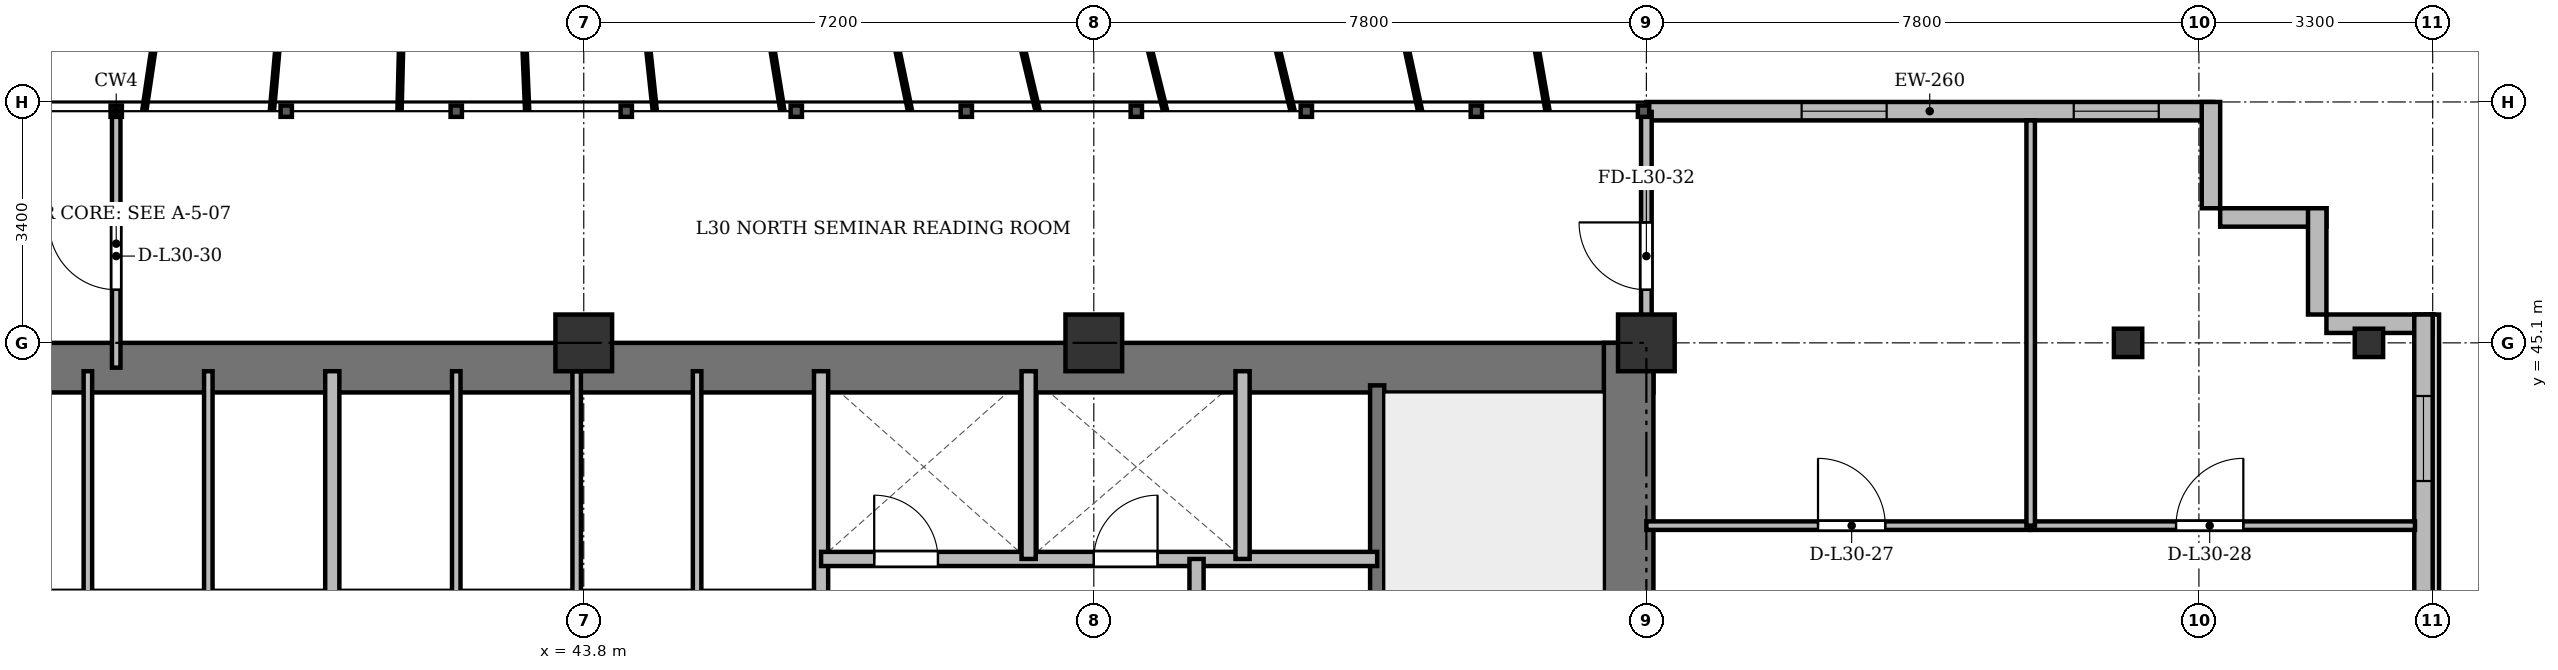
"""IFC4 building model, lengths in metres.
Left out: names, types, materials, properties, quantities, classifications, styles, units other than length and angle.
Written with IfcOpenShell. Run it as: python <this file> out.ifc"""

import sys

from ifc_helpers import new_model, si_unit, direction, frame, frame_2d, origin, origin_2d, place, context, subcontext, project, spatial, rectangle, i_section, extrude, source, transform, mapped, element, fill, save


model = new_model("IFC4")
c1 = context("Model", 3, precision=1e-05, world=origin(), true_north=direction((0.0, 1.0)))
c2 = subcontext(c1, "Body", "Model", "MODEL_VIEW")
j1 = project(units=[si_unit("LENGTHUNIT", "METRE"), si_unit("PLANEANGLEUNIT", "RADIAN")], contexts=[c1])
p1 = place(None, origin())
s1 = spatial("IfcSite", under=j1, at=p1, CompositionType="ELEMENT")
p2 = place(p1, origin())
s2 = spatial("IfcBuilding", under=s1, at=p2, CompositionType="ELEMENT")
p3 = place(p2, frame((0.0, 0.0, 117.7)))
s3 = spatial("IfcBuildingStorey", under=s2, at=p3, CompositionType="ELEMENT", Elevation=117.7)
m1 = source(origin(), c2, "Body", "SweptSolid", [
    extrude(rectangle(XDim=0.8, YDim=0.8, at=origin_2d()), origin(), (0.0, 0.0, 1.0), 3.6),
])
for number, where, z_axis, x_axis in (
    (1, (43.8, 45.1, 0.0), (0.0, 0.0, 1.0), (1.0, 0.0, 0.0)),
    (2, (51.0, 45.1, 0.0), (0.0, 0.0, 1.0), (1.0, 0.0, 0.0)),
    (3, (58.8, 45.1, 0.0), (0.0, 0.0, 1.0), (1.0, 0.0, 0.0)),
):
    element("IfcColumn", number, at=place(p3, frame(where, z_axis=z_axis, x_axis=x_axis)), inside=s3, PredefinedType="COLUMN", context=c2, shape_type="MappedRepresentation", body=[
        mapped(m1, transform((0.0, 0.0, 0.0), x_axis=(1.0, 0.0, 0.0), y_axis=(0.0, 1.0, 0.0), z_axis=(0.0, 0.0, 1.0), scale=1.0)),
    ])
m2 = source(origin(), c2, "Body", "SweptSolid", [
    extrude(i_section(OverallWidth=0.4, OverallDepth=0.4, WebThickness=0.022, FlangeThickness=0.035, at=origin_2d()), origin(), (0.0, 0.0, 1.0), 3.6),
])
for number, where, z_axis, x_axis in (
    (4, (65.6, 45.1, 0.0), (0.0, 0.0, 1.0), (1.0, 0.0, 0.0)),
    (5, (69.0, 45.1, 0.0), (0.0, 0.0, 1.0), (1.0, 0.0, 0.0)),
):
    element("IfcColumn", number, at=place(p3, frame(where, z_axis=z_axis, x_axis=x_axis)), inside=s3, PredefinedType="COLUMN", context=c2, shape_type="MappedRepresentation", body=[
        mapped(m2, transform((0.0, 0.0, 0.0), x_axis=(1.0, 0.0, 0.0), y_axis=(0.0, 1.0, 0.0), z_axis=(0.0, 0.0, 1.0), scale=1.0)),
    ])
p4 = place(p3, frame((58.8, 48.37, 0.0), z_axis=(0.0, 0.0, 1.0), x_axis=(1.0, 0.0, 0.0)))
e6 = element("IfcWall", 6, at=p4, inside=s3, PredefinedType="SOLIDWALL", context=c2, shape_type="SweptSolid", body=[
    extrude(rectangle(XDim=8.0, YDim=0.26, at=frame_2d((4.0, 0.0))), origin(), (0.0, 0.0, 1.0), 3.34),
])
p5 = place(p4, frame((2.192, 0.0, 0.9)))
e7 = element("IfcOpeningElement", 7, at=p5, cuts=e6, PredefinedType="OPENING", context=c2, shape_type="SweptSolid", body=[
    extrude(rectangle(XDim=1.2, YDim=1.65, at=frame_2d((0.6, 0.825))), frame((0.0, 0.14, 0.0), z_axis=(0.0, -1.0, 0.0), x_axis=(1.0, 0.0, 0.0)), (0.0, 0.0, 1.0), 0.28),
])
p6 = place(p4, frame((6.033, 0.0, 0.9)))
e8 = element("IfcOpeningElement", 8, at=p6, cuts=e6, PredefinedType="OPENING", context=c2, shape_type="SweptSolid", body=[
    extrude(rectangle(XDim=1.2, YDim=1.65, at=frame_2d((0.6, 0.825))), frame((0.0, 0.14, 0.0), z_axis=(0.0, -1.0, 0.0), x_axis=(1.0, 0.0, 0.0)), (0.0, 0.0, 1.0), 0.28),
])
for number, where, z_axis, x_axis in (
    (9, (66.77, 48.5, 0.0), (0.0, 0.0, 1.0), (0.0, -1.0, 0.0)),
    (10, (66.9, 46.87, 0.0), (0.0, 0.0, 1.0), (1.0, 0.0, 0.0)),
    (11, (68.27, 47.0, 0.0), (0.0, 0.0, 1.0), (0.0, -1.0, 0.0)),
):
    element("IfcWall", number, at=place(p3, frame(where, z_axis=z_axis, x_axis=x_axis)), inside=s3, PredefinedType="SOLIDWALL", context=c2, shape_type="SweptSolid", body=[
        extrude(rectangle(XDim=1.5, YDim=0.26, at=frame_2d((0.75, 0.0))), origin(), (0.0, 0.0, 1.0), 3.34),
    ])
p7 = place(p3, frame((68.4, 45.37, 0.0), z_axis=(0.0, 0.0, 1.0), x_axis=(1.0, 0.0, 0.0)))
e12 = element("IfcWall", 12, at=p7, inside=s3, PredefinedType="SOLIDWALL", context=c2, shape_type="SweptSolid", body=[
    extrude(rectangle(XDim=1.5, YDim=0.26, at=frame_2d((0.75, 0.0))), origin(), (0.0, 0.0, 1.0), 2.752),
])
p8 = place(p3, frame((69.77, 45.5, 0.0), z_axis=(0.0, 0.0, 1.0), x_axis=(0.0, -1.0, 0.0)))
e13 = element("IfcWall", 13, at=p8, inside=s3, PredefinedType="SOLIDWALL", context=c2, shape_type="SweptSolid", body=[
    extrude(rectangle(XDim=39.6, YDim=0.26, at=frame_2d((19.8, 0.0))), origin(), (0.0, 0.0, 1.0), 3.34),
])
p9 = place(p8, frame((36.95, 0.0, 0.92)))
e14 = element("IfcOpeningElement", 14, at=p9, cuts=e13, PredefinedType="OPENING", context=c2, shape_type="SweptSolid", body=[
    extrude(rectangle(XDim=1.2, YDim=1.65, at=frame_2d((0.6, 0.825))), frame((0.0, 0.14, 0.0), z_axis=(0.0, -1.0, 0.0), x_axis=(1.0, 0.0, 0.0)), (0.0, 0.0, 1.0), 0.28),
])
p10 = place(p8, frame((32.8, 0.0, 0.92)))
e15 = element("IfcOpeningElement", 15, at=p10, cuts=e13, PredefinedType="OPENING", context=c2, shape_type="SweptSolid", body=[
    extrude(rectangle(XDim=2.6, YDim=1.9, at=frame_2d((1.3, 0.95))), frame((0.0, 0.14, 0.0), z_axis=(0.0, -1.0, 0.0), x_axis=(1.0, 0.0, 0.0)), (0.0, 0.0, 1.0), 0.28),
])
p11 = place(p8, frame((28.6, 0.0, 0.92)))
e16 = element("IfcOpeningElement", 16, at=p11, cuts=e13, PredefinedType="OPENING", context=c2, shape_type="SweptSolid", body=[
    extrude(rectangle(XDim=2.6, YDim=1.9, at=frame_2d((1.3, 0.95))), frame((0.0, 0.14, 0.0), z_axis=(0.0, -1.0, 0.0), x_axis=(1.0, 0.0, 0.0)), (0.0, 0.0, 1.0), 0.28),
])
p12 = place(p8, frame((21.4, 0.0, 0.92)))
e17 = element("IfcOpeningElement", 17, at=p12, cuts=e13, PredefinedType="OPENING", context=c2, shape_type="SweptSolid", body=[
    extrude(rectangle(XDim=2.6, YDim=1.9, at=frame_2d((1.3, 0.95))), frame((0.0, 0.14, 0.0), z_axis=(0.0, -1.0, 0.0), x_axis=(1.0, 0.0, 0.0)), (0.0, 0.0, 1.0), 0.28),
])
p13 = place(p8, frame((7.4, 0.0, 0.92)))
e18 = element("IfcOpeningElement", 18, at=p13, cuts=e13, PredefinedType="OPENING", context=c2, shape_type="SweptSolid", body=[
    extrude(rectangle(XDim=2.6, YDim=1.9, at=frame_2d((1.3, 0.95))), frame((0.0, 0.14, 0.0), z_axis=(0.0, -1.0, 0.0), x_axis=(1.0, 0.0, 0.0)), (0.0, 0.0, 1.0), 0.28),
])
p14 = place(p8, frame((4.5, 0.0, 0.92)))
e19 = element("IfcOpeningElement", 19, at=p14, cuts=e13, PredefinedType="OPENING", context=c2, shape_type="SweptSolid", body=[
    extrude(rectangle(XDim=1.2, YDim=1.65, at=frame_2d((0.6, 0.825))), frame((0.0, 0.14, 0.0), z_axis=(0.0, -1.0, 0.0), x_axis=(1.0, 0.0, 0.0)), (0.0, 0.0, 1.0), 0.28),
])
p15 = place(p8, frame((1.15, 0.0, 0.92)))
e20 = element("IfcOpeningElement", 20, at=p15, cuts=e13, PredefinedType="OPENING", context=c2, shape_type="SweptSolid", body=[
    extrude(rectangle(XDim=1.2, YDim=1.65, at=frame_2d((0.6, 0.825))), frame((0.0, 0.14, 0.0), z_axis=(0.0, -1.0, 0.0), x_axis=(1.0, 0.0, 0.0)), (0.0, 0.0, 1.0), 0.28),
])
p16 = place(p3, frame((15.5, 44.75, 0.0), z_axis=(0.0, 0.0, 1.0), x_axis=(1.0, 0.0, 0.0)))
e21 = element("IfcWall", 21, at=p16, inside=s3, PredefinedType="SHEAR", context=c2, shape_type="SweptSolid", body=[
    extrude(rectangle(XDim=43.4, YDim=0.7, at=frame_2d((21.7, 0.0))), origin(), (0.0, 0.0, 1.0), 3.34),
])
p17 = place(p3, frame((58.55, 33.4, 0.0), z_axis=(0.0, 0.0, 1.0), x_axis=(0.0, 1.0, 0.0)))
e22 = element("IfcWall", 22, at=p17, inside=s3, PredefinedType="SHEAR", context=c2, shape_type="SweptSolid", body=[
    extrude(rectangle(XDim=11.7, YDim=0.7, at=frame_2d((5.85, 0.0))), origin(), (0.0, 0.0, 1.0), 3.34),
])
p18 = place(p3, frame((55.0, 33.4, 0.0), z_axis=(0.0, 0.0, 1.0), x_axis=(0.0, 1.0, 0.0)))
e23 = element("IfcWall", 23, at=p18, inside=s3, PredefinedType="SHEAR", context=c2, shape_type="SweptSolid", body=[
    extrude(rectangle(XDim=11.1, YDim=0.2, at=frame_2d((5.55, 0.0))), origin(), (0.0, 0.0, 1.0), 3.34),
])
p19 = place(p18, frame((0.85, 0.0, 0.0)))
e24 = element("IfcOpeningElement", 24, at=p19, cuts=e23, PredefinedType="OPENING", context=c2, shape_type="SweptSolid", body=[
    extrude(rectangle(XDim=1.1, YDim=2.15, at=frame_2d((0.55, 1.075))), frame((0.0, 0.11, 0.0), z_axis=(0.0, -1.0, 0.0), x_axis=(1.0, 0.0, 0.0)), (0.0, 0.0, 1.0), 0.22),
])
for number, where, z_axis, x_axis in (
    (25, (36.8, 41.5, 0.0), (0.0, 0.0, 1.0), (0.0, 1.0, 0.0)),
    (26, (38.5, 41.5, 0.0), (0.0, 0.0, 1.0), (0.0, 1.0, 0.0)),
):
    element("IfcWall", number, at=place(p3, frame(where, z_axis=z_axis, x_axis=x_axis)), inside=s3, PredefinedType="PARTITIONING", context=c2, shape_type="SweptSolid", body=[
        extrude(rectangle(XDim=3.2, YDim=0.12, at=frame_2d((1.6, 0.0))), origin(), (0.0, 0.0, 1.0), 3.34),
    ])
p20 = place(p3, frame((40.25, 41.5, 0.0), z_axis=(0.0, 0.0, 1.0), x_axis=(0.0, 1.0, 0.0)))
e27 = element("IfcWall", 27, at=p20, inside=s3, PredefinedType="SOLIDWALL", context=c2, shape_type="SweptSolid", body=[
    extrude(rectangle(XDim=3.2, YDim=0.2, at=frame_2d((1.6, 0.0))), origin(), (0.0, 0.0, 1.0), 3.34),
])
p21 = place(p3, frame((42.0, 41.5, 0.0), z_axis=(0.0, 0.0, 1.0), x_axis=(0.0, 1.0, 0.0)))
e28 = element("IfcWall", 28, at=p21, inside=s3, PredefinedType="PARTITIONING", context=c2, shape_type="SweptSolid", body=[
    extrude(rectangle(XDim=3.2, YDim=0.12, at=frame_2d((1.6, 0.0))), origin(), (0.0, 0.0, 1.0), 3.34),
])
p22 = place(p3, frame((43.7, 41.5, 0.0), z_axis=(0.0, 0.0, 1.0), x_axis=(0.0, 1.0, 0.0)))
e29 = element("IfcWall", 29, at=p22, inside=s3, PredefinedType="PARTITIONING", context=c2, shape_type="SweptSolid", body=[
    extrude(rectangle(XDim=3.2, YDim=0.12, at=frame_2d((1.6, 0.0))), origin(), (0.0, 0.0, 1.0), 2.84),
])
p23 = place(p3, frame((45.4, 41.5, 0.0), z_axis=(0.0, 0.0, 1.0), x_axis=(0.0, 1.0, 0.0)))
e30 = element("IfcWall", 30, at=p23, inside=s3, PredefinedType="PARTITIONING", context=c2, shape_type="SweptSolid", body=[
    extrude(rectangle(XDim=3.2, YDim=0.12, at=frame_2d((1.6, 0.0))), origin(), (0.0, 0.0, 1.0), 3.34),
])
p24 = place(p3, frame((47.15, 33.4, 0.0), z_axis=(0.0, 0.0, 1.0), x_axis=(0.0, 1.0, 0.0)))
e31 = element("IfcWall", 31, at=p24, inside=s3, PredefinedType="SOLIDWALL", context=c2, shape_type="SweptSolid", body=[
    extrude(rectangle(XDim=11.3, YDim=0.2, at=frame_2d((5.65, 0.0))), origin(), (0.0, 0.0, 1.0), 2.752),
])
p25 = place(p3, frame((47.15, 42.05, 0.0), z_axis=(0.0, 0.0, 1.0), x_axis=(1.0, 0.0, 0.0)))
e32 = element("IfcWall", 32, at=p25, inside=s3, PredefinedType="SOLIDWALL", context=c2, shape_type="SweptSolid", body=[
    extrude(rectangle(XDim=7.85, YDim=0.2, at=frame_2d((3.925, 0.0))), origin(), (0.0, 0.0, 1.0), 2.84),
])
p26 = place(p25, frame((0.75, 0.0, 0.0)))
e33 = element("IfcOpeningElement", 33, at=p26, cuts=e32, PredefinedType="OPENING", context=c2, shape_type="SweptSolid", body=[
    extrude(rectangle(XDim=0.9, YDim=2.1, at=frame_2d((0.45, 1.05))), frame((0.0, 0.11, 0.0), z_axis=(0.0, -1.0, 0.0), x_axis=(1.0, 0.0, 0.0)), (0.0, 0.0, 1.0), 0.22),
])
p27 = place(p25, frame((3.85, 0.0, 0.0)))
e34 = element("IfcOpeningElement", 34, at=p27, cuts=e32, PredefinedType="OPENING", context=c2, shape_type="SweptSolid", body=[
    extrude(rectangle(XDim=0.9, YDim=2.1, at=frame_2d((0.45, 1.05))), frame((0.0, 0.11, 0.0), z_axis=(0.0, -1.0, 0.0), x_axis=(1.0, 0.0, 0.0)), (0.0, 0.0, 1.0), 0.22),
])
for number, where, z_axis, x_axis in (
    (35, (50.08, 42.05, 0.0), (0.0, 0.0, 1.0), (0.0, 1.0, 0.0)),
    (36, (53.1, 42.05, 0.0), (0.0, 0.0, 1.0), (0.0, 1.0, 0.0)),
):
    element("IfcWall", number, at=place(p3, frame(where, z_axis=z_axis, x_axis=x_axis)), inside=s3, PredefinedType="SOLIDWALL", context=c2, shape_type="SweptSolid", body=[
        extrude(rectangle(XDim=2.65, YDim=0.2, at=frame_2d((1.325, 0.0))), origin(), (0.0, 0.0, 1.0), 3.34),
    ])
p28 = place(p3, frame((52.45, 33.4, 0.0), z_axis=(0.0, 0.0, 1.0), x_axis=(0.0, 1.0, 0.0)))
e37 = element("IfcWall", 37, at=p28, inside=s3, PredefinedType="PARTITIONING", context=c2, shape_type="SweptSolid", body=[
    extrude(rectangle(XDim=8.65, YDim=0.2, at=frame_2d((4.325, 0.0))), origin(), (0.0, 0.0, 1.0), 2.752),
])
p29 = place(p28, frame((6.2, 0.0, 0.0)))
e38 = element("IfcOpeningElement", 38, at=p29, cuts=e37, PredefinedType="OPENING", context=c2, shape_type="SweptSolid", body=[
    extrude(rectangle(XDim=0.95, YDim=2.15, at=frame_2d((0.475, 1.075))), frame((0.0, 0.11, 0.0), z_axis=(0.0, -1.0, 0.0), x_axis=(1.0, 0.0, 0.0)), (0.0, 0.0, 1.0), 0.22),
])
p30 = place(p3, frame((58.8, 42.52, 0.0), z_axis=(0.0, 0.0, 1.0), x_axis=(1.0, 0.0, 0.0)))
e39 = element("IfcWall", 39, at=p30, inside=s3, PredefinedType="PARTITIONING", context=c2, shape_type="SweptSolid", body=[
    extrude(rectangle(XDim=5.425, YDim=0.12, at=frame_2d((2.712, 0.0))), origin(), (0.0, 0.0, 1.0), 2.84),
])
p31 = place(p30, frame((2.423, 0.0, 0.0)))
e40 = element("IfcOpeningElement", 40, at=p31, cuts=e39, PredefinedType="OPENING", context=c2, shape_type="SweptSolid", body=[
    extrude(rectangle(XDim=0.95, YDim=2.15, at=frame_2d((0.475, 1.075))), frame((0.0, 0.07, 0.0), z_axis=(0.0, -1.0, 0.0), x_axis=(1.0, 0.0, 0.0)), (0.0, 0.0, 1.0), 0.14),
])
p32 = place(p3, frame((64.225, 42.52, 0.0), z_axis=(0.0, 0.0, 1.0), x_axis=(1.0, 0.0, 0.0)))
e41 = element("IfcWall", 41, at=p32, inside=s3, PredefinedType="PARTITIONING", context=c2, shape_type="SweptSolid", body=[
    extrude(rectangle(XDim=5.425, YDim=0.12, at=frame_2d((2.712, 0.0))), origin(), (0.0, 0.0, 1.0), 2.84),
])
p33 = place(p32, frame((2.052, 0.0, 0.0)))
e42 = element("IfcOpeningElement", 42, at=p33, cuts=e41, PredefinedType="OPENING", context=c2, shape_type="SweptSolid", body=[
    extrude(rectangle(XDim=0.95, YDim=2.15, at=frame_2d((0.475, 1.075))), frame((0.0, 0.07, 0.0), z_axis=(0.0, -1.0, 0.0), x_axis=(1.0, 0.0, 0.0)), (0.0, 0.0, 1.0), 0.14),
])
p34 = place(p3, frame((64.225, 42.52, 0.0), z_axis=(0.0, 0.0, 1.0), x_axis=(0.0, 1.0, 0.0)))
e43 = element("IfcWall", 43, at=p34, inside=s3, PredefinedType="PARTITIONING", context=c2, shape_type="SweptSolid", body=[
    extrude(rectangle(XDim=5.72, YDim=0.12, at=frame_2d((2.86, 0.0))), origin(), (0.0, 0.0, 1.0), 2.752),
])
p35 = place(p3, frame((37.2, 44.75, 0.0), z_axis=(0.0, 0.0, 1.0), x_axis=(0.0, 1.0, 0.0)))
e44 = element("IfcWall", 44, at=p35, inside=s3, PredefinedType="PARTITIONING", context=c2, shape_type="SweptSolid", body=[
    extrude(rectangle(XDim=3.61, YDim=0.12, at=frame_2d((1.805, 0.0))), origin(), (0.0, 0.0, 1.0), 2.752),
])
p36 = place(p35, frame((1.1, 0.0, 0.0)))
e45 = element("IfcOpeningElement", 45, at=p36, cuts=e44, PredefinedType="OPENING", context=c2, shape_type="SweptSolid", body=[
    extrude(rectangle(XDim=0.95, YDim=2.15, at=frame_2d((0.475, 1.075))), frame((0.0, 0.07, 0.0), z_axis=(0.0, -1.0, 0.0), x_axis=(1.0, 0.0, 0.0)), (0.0, 0.0, 1.0), 0.14),
])
p37 = place(p3, frame((58.8, 44.75, 0.0), z_axis=(0.0, 0.0, 1.0), x_axis=(0.0, 1.0, 0.0)))
e46 = element("IfcWall", 46, at=p37, inside=s3, PredefinedType="PARTITIONING", context=c2, shape_type="SweptSolid", body=[
    extrude(rectangle(XDim=3.61, YDim=0.15, at=frame_2d((1.805, 0.0))), origin(), (0.0, 0.0, 1.0), 2.84),
])
p38 = place(p37, frame((1.1, 0.0, 0.0)))
e47 = element("IfcOpeningElement", 47, at=p38, cuts=e46, PredefinedType="OPENING", context=c2, shape_type="SweptSolid", body=[
    extrude(rectangle(XDim=0.95, YDim=2.15, at=frame_2d((0.475, 1.075))), frame((0.0, 0.085, 0.0), z_axis=(0.0, -1.0, 0.0), x_axis=(1.0, 0.0, 0.0)), (0.0, 0.0, 1.0), 0.17),
])
m3 = source(origin(), c2, "Body", "SweptSolid", [
    extrude(rectangle(XDim=1.2, YDim=1.65, at=frame_2d((0.6, 0.825))), frame((0.0, 0.03, 0.0), z_axis=(0.0, -1.0, 0.0), x_axis=(1.0, 0.0, 0.0)), (0.0, 0.0, 1.0), 0.06),
])
p39 = place(p5, origin())
e48 = element("IfcWindow", 48, at=p39, inside=s3, PartitioningType="SINGLE_PANEL", PredefinedType="WINDOW", context=c2, shape_type="MappedRepresentation", body=[
    mapped(m3, transform((0.0, 0.0, 0.0), x_axis=(1.0, 0.0, 0.0), y_axis=(0.0, 1.0, 0.0), z_axis=(0.0, 0.0, 1.0), scale=1.0)),
])
fill(e7, e48)
p40 = place(p6, origin())
e49 = element("IfcWindow", 49, at=p40, inside=s3, PartitioningType="SINGLE_PANEL", PredefinedType="WINDOW", context=c2, shape_type="MappedRepresentation", body=[
    mapped(m3, transform((0.0, 0.0, 0.0), x_axis=(1.0, 0.0, 0.0), y_axis=(0.0, 1.0, 0.0), z_axis=(0.0, 0.0, 1.0), scale=1.0)),
])
fill(e8, e49)
p41 = place(p15, origin())
e50 = element("IfcWindow", 50, at=p41, inside=s3, PartitioningType="SINGLE_PANEL", PredefinedType="WINDOW", context=c2, shape_type="MappedRepresentation", body=[
    mapped(m3, transform((0.0, 0.0, 0.0), x_axis=(1.0, 0.0, 0.0), y_axis=(0.0, 1.0, 0.0), z_axis=(0.0, 0.0, 1.0), scale=1.0)),
])
fill(e20, e50)
m4 = source(origin(), c2, "Body", "SweptSolid", [
    extrude(rectangle(XDim=0.9, YDim=2.1, at=frame_2d((0.45, 1.05))), frame((0.0, 0.025, 0.0), z_axis=(0.0, -1.0, 0.0), x_axis=(1.0, 0.0, 0.0)), (0.0, 0.0, 1.0), 0.05),
])
p42 = place(p26, origin())
e51 = element("IfcDoor", 51, at=p42, inside=s3, OperationType="SINGLE_SWING_LEFT", PredefinedType="DOOR", context=c2, shape_type="MappedRepresentation", body=[
    mapped(m4, transform((0.0, 0.0, 0.0), x_axis=(1.0, 0.0, 0.0), y_axis=(0.0, 1.0, 0.0), z_axis=(0.0, 0.0, 1.0), scale=1.0)),
])
fill(e33, e51)
p43 = place(p27, origin())
e52 = element("IfcDoor", 52, at=p43, inside=s3, OperationType="SINGLE_SWING_RIGHT", PredefinedType="DOOR", context=c2, shape_type="MappedRepresentation", body=[
    mapped(m4, transform((0.0, 0.0, 0.0), x_axis=(1.0, 0.0, 0.0), y_axis=(0.0, 1.0, 0.0), z_axis=(0.0, 0.0, 1.0), scale=1.0)),
])
fill(e34, e52)
m5 = source(origin(), c2, "Body", "SweptSolid", [
    extrude(rectangle(XDim=0.95, YDim=2.15, at=frame_2d((0.475, 1.075))), frame((0.0, 0.025, 0.0), z_axis=(0.0, -1.0, 0.0), x_axis=(1.0, 0.0, 0.0)), (0.0, 0.0, 1.0), 0.05),
])
p44 = place(p31, origin())
e53 = element("IfcDoor", 53, at=p44, inside=s3, OperationType="SINGLE_SWING_LEFT", PredefinedType="DOOR", context=c2, shape_type="MappedRepresentation", body=[
    mapped(m5, transform((0.0, 0.0, 0.0), x_axis=(1.0, 0.0, 0.0), y_axis=(0.0, 1.0, 0.0), z_axis=(0.0, 0.0, 1.0), scale=1.0)),
])
fill(e40, e53)
p45 = place(p33, origin())
e54 = element("IfcDoor", 54, at=p45, inside=s3, OperationType="SINGLE_SWING_RIGHT", PredefinedType="DOOR", context=c2, shape_type="MappedRepresentation", body=[
    mapped(m5, transform((0.0, 0.0, 0.0), x_axis=(1.0, 0.0, 0.0), y_axis=(0.0, 1.0, 0.0), z_axis=(0.0, 0.0, 1.0), scale=1.0)),
])
fill(e42, e54)
p46 = place(p36, origin())
e55 = element("IfcDoor", 55, at=p46, inside=s3, OperationType="SINGLE_SWING_RIGHT", PredefinedType="DOOR", context=c2, shape_type="MappedRepresentation", body=[
    mapped(m5, transform((0.0, 0.0, 0.0), x_axis=(1.0, 0.0, 0.0), y_axis=(0.0, 1.0, 0.0), z_axis=(0.0, 0.0, 1.0), scale=1.0)),
])
fill(e45, e55)
p47 = place(p38, origin())
e56 = element("IfcDoor", 56, at=p47, inside=s3, OperationType="SINGLE_SWING_RIGHT", PredefinedType="DOOR", context=c2, shape_type="MappedRepresentation", body=[
    mapped(m5, transform((0.0, 0.0, 0.0), x_axis=(1.0, 0.0, 0.0), y_axis=(0.0, 1.0, 0.0), z_axis=(0.0, 0.0, 1.0), scale=1.0)),
])
fill(e47, e56)
save(model, sys.argv[1])
